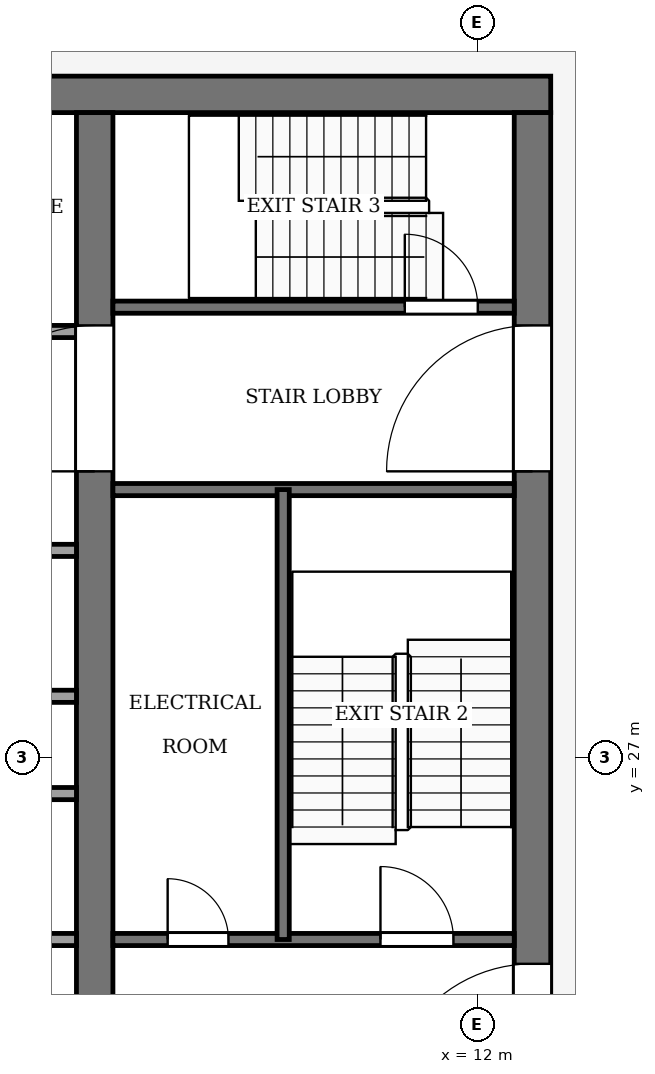
"""IFC4 building model, lengths in metres.
Left out: names, types, materials, properties, quantities, classifications, styles, units other than length and angle.
Written with IfcOpenShell. Run it as: python <this file> out.ifc"""

import sys

from ifc_helpers import new_model, si_unit, direction, frame, frame_2d, origin, place, context, subcontext, project, spatial, rectangle, extrude, element, fill, save


model = new_model("IFC4")
c1 = context("Model", 3, precision=1e-05, world=origin(), true_north=direction((0.0, 1.0)))
c2 = subcontext(c1, "Body", "Model", "MODEL_VIEW")
j1 = project(units=[si_unit("LENGTHUNIT", "METRE"), si_unit("PLANEANGLEUNIT", "RADIAN")], contexts=[c1])
p1 = place(None, origin())
s1 = spatial("IfcSite", under=j1, at=p1, CompositionType="ELEMENT")
p2 = place(p1, origin())
s2 = spatial("IfcBuilding", under=s1, at=p2, CompositionType="ELEMENT")
p3 = place(p2, frame((0.0, 0.0, 310.0)))
s3 = spatial("IfcBuildingStorey", under=s2, at=p3, CompositionType="ELEMENT", Elevation=310.0)
p4 = place(p3, frame((-13.2, 37.9, -0.13), z_axis=(0.0, 0.0, 1.0), x_axis=(1.0, 0.0, 0.0)))
e1 = element("IfcWall", 1, at=p4, inside=s3, PredefinedType="SHEAR", context=c2, shape_type="SweptSolid", body=[
    extrude(rectangle(XDim=26.4, YDim=0.6, at=frame_2d((13.2, 0.0))), origin(), (0.0, 0.0, 1.0), 4.0),
])
p5 = place(p3, frame((12.9, 18.4, -0.13), z_axis=(0.0, 0.0, 1.0), x_axis=(0.0, 1.0, 0.0)))
e2 = element("IfcWall", 2, at=p5, inside=s3, PredefinedType="SHEAR", context=c2, shape_type="SweptSolid", body=[
    extrude(rectangle(XDim=19.2, YDim=0.6, at=frame_2d((9.6, 0.0))), origin(), (0.0, 0.0, 1.0), 4.0),
])
p6 = place(p5, frame((2.8, 0.0, 0.13)))
e3 = element("IfcOpeningElement", 3, at=p6, cuts=e2, PredefinedType="OPENING", context=c2, shape_type="SweptSolid", body=[
    extrude(rectangle(XDim=2.4, YDim=2.4, at=frame_2d((1.2, 1.2))), frame((0.0, 0.31, 0.0), z_axis=(0.0, -1.0, 0.0), x_axis=(1.0, 0.0, 0.0)), (0.0, 0.0, 1.0), 0.62),
])
p7 = place(p5, frame((13.3, 0.0, 0.13)))
e4 = element("IfcOpeningElement", 4, at=p7, cuts=e2, PredefinedType="OPENING", context=c2, shape_type="SweptSolid", body=[
    extrude(rectangle(XDim=2.4, YDim=2.4, at=frame_2d((1.2, 1.2))), frame((0.0, 0.31, 0.0), z_axis=(0.0, -1.0, 0.0), x_axis=(1.0, 0.0, 0.0)), (0.0, 0.0, 1.0), 0.62),
])
p8 = place(p3, frame((5.7, 18.4, -0.13), z_axis=(0.0, 0.0, 1.0), x_axis=(0.0, 1.0, 0.0)))
e5 = element("IfcWall", 5, at=p8, inside=s3, PredefinedType="SHEAR", context=c2, shape_type="SweptSolid", body=[
    extrude(rectangle(XDim=19.2, YDim=0.6, at=frame_2d((9.6, 0.0))), origin(), (0.0, 0.0, 1.0), 4.0),
])
p9 = place(p8, frame((13.3, 0.0, 0.13)))
e6 = element("IfcOpeningElement", 6, at=p9, cuts=e5, PredefinedType="OPENING", context=c2, shape_type="SweptSolid", body=[
    extrude(rectangle(XDim=2.4, YDim=2.4, at=frame_2d((1.2, 1.2))), frame((0.0, 0.31, 0.0), z_axis=(0.0, -1.0, 0.0), x_axis=(1.0, 0.0, 0.0)), (0.0, 0.0, 1.0), 0.62),
])
p10 = place(p3, frame((-5.4, 24.0, 0.0), z_axis=(0.0, 0.0, 1.0), x_axis=(1.0, 0.0, 0.0)))
e7 = element("IfcWall", 7, at=p10, inside=s3, PredefinedType="PARTITIONING", context=c2, shape_type="SweptSolid", body=[
    extrude(rectangle(XDim=10.8, YDim=0.2, at=frame_2d((5.4, 0.0))), origin(), (0.0, 0.0, 1.0), 3.87),
])
p11 = place(p10, frame((1.768, 0.0, 0.0)))
e8 = element("IfcOpeningElement", 8, at=p11, cuts=e7, PredefinedType="OPENING", context=c2, shape_type="SweptSolid", body=[
    extrude(rectangle(XDim=1.0, YDim=2.1, at=frame_2d((0.5, 1.05))), frame((0.0, 0.11, 0.0), z_axis=(0.0, -1.0, 0.0), x_axis=(1.0, 0.0, 0.0)), (0.0, 0.0, 1.0), 0.22),
])
p12 = place(p10, frame((7.168, 0.0, 0.0)))
e9 = element("IfcOpeningElement", 9, at=p12, cuts=e7, PredefinedType="OPENING", context=c2, shape_type="SweptSolid", body=[
    extrude(rectangle(XDim=1.0, YDim=2.1, at=frame_2d((0.5, 1.05))), frame((0.0, 0.11, 0.0), z_axis=(0.0, -1.0, 0.0), x_axis=(1.0, 0.0, 0.0)), (0.0, 0.0, 1.0), 0.22),
])
p13 = place(p3, frame((6.0, 24.0, 0.0), z_axis=(0.0, 0.0, 1.0), x_axis=(1.0, 0.0, 0.0)))
e10 = element("IfcWall", 10, at=p13, inside=s3, PredefinedType="PARTITIONING", context=c2, shape_type="SweptSolid", body=[
    extrude(rectangle(XDim=6.6, YDim=0.2, at=frame_2d((3.3, 0.0))), origin(), (0.0, 0.0, 1.0), 3.87),
])
p14 = place(p13, frame((0.9, 0.0, 0.0)))
e11 = element("IfcOpeningElement", 11, at=p14, cuts=e10, PredefinedType="OPENING", context=c2, shape_type="SweptSolid", body=[
    extrude(rectangle(XDim=1.0, YDim=2.1, at=frame_2d((0.5, 1.05))), frame((0.0, 0.11, 0.0), z_axis=(0.0, -1.0, 0.0), x_axis=(1.0, 0.0, 0.0)), (0.0, 0.0, 1.0), 0.22),
])
p15 = place(p13, frame((4.4, 0.0, 0.0)))
e12 = element("IfcOpeningElement", 12, at=p15, cuts=e10, PredefinedType="OPENING", context=c2, shape_type="SweptSolid", body=[
    extrude(rectangle(XDim=1.2, YDim=2.2, at=frame_2d((0.6, 1.1))), frame((0.0, 0.11, 0.0), z_axis=(0.0, -1.0, 0.0), x_axis=(1.0, 0.0, 0.0)), (0.0, 0.0, 1.0), 0.22),
])
for number, where, z_axis, x_axis in (
    (13, (-5.4, 26.4, 0.0), (0.0, 0.0, 1.0), (1.0, 0.0, 0.0)),
    (14, (-5.4, 28.0, 0.0), (0.0, 0.0, 1.0), (1.0, 0.0, 0.0)),
):
    element("IfcWall", number, at=place(p3, frame(where, z_axis=z_axis, x_axis=x_axis)), inside=s3, PredefinedType="PARTITIONING", context=c2, shape_type="SweptSolid", body=[
        extrude(rectangle(XDim=10.8, YDim=0.2, at=frame_2d((5.4, 0.0))), origin(), (0.0, 0.0, 1.0), 3.87),
    ])
p16 = place(p3, frame((-5.4, 30.4, 0.0), z_axis=(0.0, 0.0, 1.0), x_axis=(1.0, 0.0, 0.0)))
e15 = element("IfcWall", 15, at=p16, inside=s3, PredefinedType="PARTITIONING", context=c2, shape_type="SweptSolid", body=[
    extrude(rectangle(XDim=10.8, YDim=0.2, at=frame_2d((5.4, 0.0))), origin(), (0.0, 0.0, 1.0), 3.87),
])
p17 = place(p16, frame((1.66, 0.0, 0.0)))
e16 = element("IfcOpeningElement", 16, at=p17, cuts=e15, PredefinedType="OPENING", context=c2, shape_type="SweptSolid", body=[
    extrude(rectangle(XDim=1.0, YDim=2.1, at=frame_2d((0.5, 1.05))), frame((0.0, 0.11, 0.0), z_axis=(0.0, -1.0, 0.0), x_axis=(1.0, 0.0, 0.0)), (0.0, 0.0, 1.0), 0.22),
])
p18 = place(p16, frame((7.06, 0.0, 0.0)))
e17 = element("IfcOpeningElement", 17, at=p18, cuts=e15, PredefinedType="OPENING", context=c2, shape_type="SweptSolid", body=[
    extrude(rectangle(XDim=1.0, YDim=2.1, at=frame_2d((0.5, 1.05))), frame((0.0, 0.11, 0.0), z_axis=(0.0, -1.0, 0.0), x_axis=(1.0, 0.0, 0.0)), (0.0, 0.0, 1.0), 0.22),
])
p19 = place(p3, frame((6.0, 31.4, 0.0), z_axis=(0.0, 0.0, 1.0), x_axis=(1.0, 0.0, 0.0)))
e18 = element("IfcWall", 18, at=p19, inside=s3, PredefinedType="PARTITIONING", context=c2, shape_type="SweptSolid", body=[
    extrude(rectangle(XDim=6.6, YDim=0.2, at=frame_2d((3.3, 0.0))), origin(), (0.0, 0.0, 1.0), 3.87),
])
p20 = place(p3, frame((-5.4, 34.0, 0.0), z_axis=(0.0, 0.0, 1.0), x_axis=(1.0, 0.0, 0.0)))
e19 = element("IfcWall", 19, at=p20, inside=s3, PredefinedType="PARTITIONING", context=c2, shape_type="SweptSolid", body=[
    extrude(rectangle(XDim=10.8, YDim=0.2, at=frame_2d((5.4, 0.0))), origin(), (0.0, 0.0, 1.0), 3.87),
])
p21 = place(p20, frame((6.15, 0.0, 0.0)))
e20 = element("IfcOpeningElement", 20, at=p21, cuts=e19, PredefinedType="OPENING", context=c2, shape_type="SweptSolid", body=[
    extrude(rectangle(XDim=1.2, YDim=2.2, at=frame_2d((0.6, 1.1))), frame((0.0, 0.11, 0.0), z_axis=(0.0, -1.0, 0.0), x_axis=(1.0, 0.0, 0.0)), (0.0, 0.0, 1.0), 0.22),
])
p22 = place(p20, frame((8.95, 0.0, 0.0)))
e21 = element("IfcOpeningElement", 21, at=p22, cuts=e19, PredefinedType="OPENING", context=c2, shape_type="SweptSolid", body=[
    extrude(rectangle(XDim=1.0, YDim=2.1, at=frame_2d((0.5, 1.05))), frame((0.0, 0.11, 0.0), z_axis=(0.0, -1.0, 0.0), x_axis=(1.0, 0.0, 0.0)), (0.0, 0.0, 1.0), 0.22),
])
p23 = place(p3, frame((6.0, 34.4, 0.0), z_axis=(0.0, 0.0, 1.0), x_axis=(1.0, 0.0, 0.0)))
e22 = element("IfcWall", 22, at=p23, inside=s3, PredefinedType="PARTITIONING", context=c2, shape_type="SweptSolid", body=[
    extrude(rectangle(XDim=6.6, YDim=0.2, at=frame_2d((3.3, 0.0))), origin(), (0.0, 0.0, 1.0), 3.87),
])
p24 = place(p23, frame((4.8, 0.0, 0.0)))
e23 = element("IfcOpeningElement", 23, at=p24, cuts=e22, PredefinedType="OPENING", context=c2, shape_type="SweptSolid", body=[
    extrude(rectangle(XDim=1.2, YDim=2.2, at=frame_2d((0.6, 1.1))), frame((0.0, 0.11, 0.0), z_axis=(0.0, -1.0, 0.0), x_axis=(1.0, 0.0, 0.0)), (0.0, 0.0, 1.0), 0.22),
])
p25 = place(p3, frame((8.8, 24.0, 0.0), z_axis=(0.0, 0.0, 1.0), x_axis=(0.0, 1.0, 0.0)))
e24 = element("IfcWall", 24, at=p25, inside=s3, PredefinedType="PARTITIONING", context=c2, shape_type="SweptSolid", body=[
    extrude(rectangle(XDim=7.4, YDim=0.2, at=frame_2d((3.7, 0.0))), origin(), (0.0, 0.0, 1.0), 3.87),
])
p26 = place(p14, origin())
e25 = element("IfcDoor", 25, at=p26, inside=s3, OperationType="SINGLE_SWING_LEFT", PredefinedType="DOOR", context=c2, shape_type="SweptSolid", body=[
    extrude(rectangle(XDim=1.0, YDim=2.1, at=frame_2d((0.5, 1.05))), frame((0.0, 0.025, 0.0), z_axis=(0.0, -1.0, 0.0), x_axis=(1.0, 0.0, 0.0)), (0.0, 0.0, 1.0), 0.05),
])
fill(e11, e25)
p27 = place(p15, origin())
e26 = element("IfcDoor", 26, at=p27, inside=s3, OperationType="SINGLE_SWING_LEFT", PredefinedType="DOOR", context=c2, shape_type="SweptSolid", body=[
    extrude(rectangle(XDim=1.2, YDim=2.2, at=frame_2d((0.6, 1.1))), frame((0.0, 0.025, 0.0), z_axis=(0.0, -1.0, 0.0), x_axis=(1.0, 0.0, 0.0)), (0.0, 0.0, 1.0), 0.05),
])
fill(e12, e26)
p28 = place(p24, origin())
e27 = element("IfcDoor", 27, at=p28, inside=s3, OperationType="SINGLE_SWING_RIGHT", PredefinedType="DOOR", context=c2, shape_type="SweptSolid", body=[
    extrude(rectangle(XDim=1.2, YDim=2.2, at=frame_2d((0.6, 1.1))), frame((0.0, 0.025, 0.0), z_axis=(0.0, -1.0, 0.0), x_axis=(1.0, 0.0, 0.0)), (0.0, 0.0, 1.0), 0.05),
])
fill(e23, e27)
p29 = place(p9, origin())
e28 = element("IfcDoor", 28, at=p29, inside=s3, OperationType="DOUBLE_DOOR_SINGLE_SWING", PredefinedType="DOOR", context=c2, shape_type="SweptSolid", body=[
    extrude(rectangle(XDim=2.4, YDim=2.4, at=frame_2d((1.2, 1.2))), frame((0.0, 0.025, 0.0), z_axis=(0.0, -1.0, 0.0), x_axis=(1.0, 0.0, 0.0)), (0.0, 0.0, 1.0), 0.05),
])
fill(e6, e28)
p30 = place(p6, origin())
e29 = element("IfcDoor", 29, at=p30, inside=s3, OperationType="DOUBLE_DOOR_SINGLE_SWING", PredefinedType="DOOR", context=c2, shape_type="SweptSolid", body=[
    extrude(rectangle(XDim=2.4, YDim=2.4, at=frame_2d((1.2, 1.2))), frame((0.0, 0.025, 0.0), z_axis=(0.0, -1.0, 0.0), x_axis=(1.0, 0.0, 0.0)), (0.0, 0.0, 1.0), 0.05),
])
fill(e3, e29)
p31 = place(p7, origin())
e30 = element("IfcDoor", 30, at=p31, inside=s3, OperationType="DOUBLE_DOOR_SINGLE_SWING", PredefinedType="DOOR", context=c2, shape_type="SweptSolid", body=[
    extrude(rectangle(XDim=2.4, YDim=2.4, at=frame_2d((1.2, 1.2))), frame((0.0, 0.025, 0.0), z_axis=(0.0, -1.0, 0.0), x_axis=(1.0, 0.0, 0.0)), (0.0, 0.0, 1.0), 0.05),
])
fill(e4, e30)
save(model, sys.argv[1])
